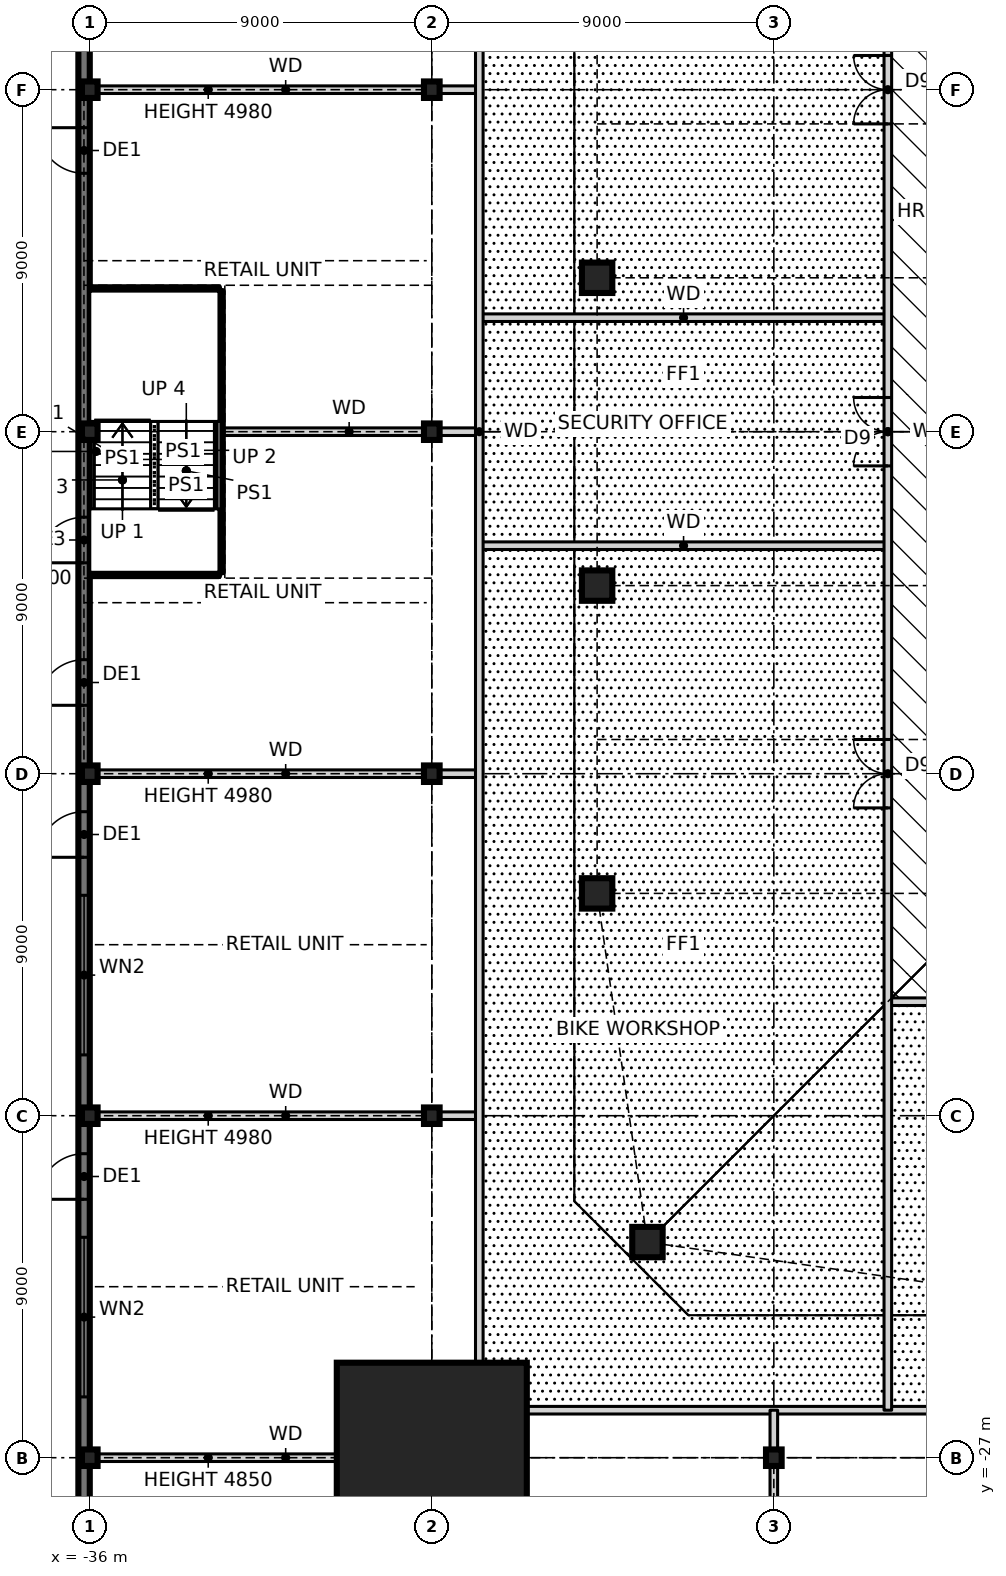
"""IFC4 building model, lengths in metres.
Left out: names, types, materials, properties, quantities, classifications, styles, units other than length and angle.
Written with IfcOpenShell. Run it as: python <this file> out.ifc"""

import sys

from ifc_helpers import new_model, si_unit, direction, frame, frame_2d, origin, origin_2d, place, context, subcontext, project, spatial, rectangle, hollow_rectangle, i_section, extrude, element, fill, save


model = new_model("IFC4")
c1 = context("Model", 3, precision=1e-05, world=origin(), true_north=direction((0.0, 1.0)))
c2 = subcontext(c1, "Body", "Model", "MODEL_VIEW")
j1 = project(units=[si_unit("LENGTHUNIT", "METRE"), si_unit("PLANEANGLEUNIT", "RADIAN")], contexts=[c1])
p1 = place(None, origin())
s1 = spatial("IfcSite", under=j1, at=p1, CompositionType="ELEMENT")
p2 = place(p1, origin())
s2 = spatial("IfcBuilding", under=s1, at=p2, CompositionType="ELEMENT")
p3 = place(p2, origin())
s3 = spatial("IfcBuildingStorey", under=s2, at=p3, CompositionType="ELEMENT", Elevation=0.0)
for number, where, z_axis, x_axis in (
    (1, (-21.326, -21.326, 0.0), (0.0, 0.0, 1.0), (1.0, 0.0, 0.0)),
    (2, (-22.65, 4.05, 0.0), (0.0, 0.0, 1.0), (1.0, 0.0, 0.0)),
    (3, (-22.65, -4.05, 0.0), (0.0, 0.0, 1.0), (1.0, 0.0, 0.0)),
    (4, (-22.65, -12.15, 0.0), (0.0, 0.0, 1.0), (1.0, 0.0, 0.0)),
):
    element("IfcColumn", number, at=place(p3, frame(where, z_axis=z_axis, x_axis=x_axis)), inside=s3, PredefinedType="COLUMN", context=c2, shape_type="SweptSolid", body=[
        extrude(hollow_rectangle(XDim=0.8, YDim=0.8, WallThickness=0.09, at=origin_2d()), origin(), (0.0, 0.0, 1.0), 6.0),
    ])
p4 = place(p3, frame((-27.0, -27.0, 0.0), z_axis=(0.0, 0.0, 1.0), x_axis=(1.0, 0.0, 0.0)))
e5 = element("IfcColumn", 5, at=p4, inside=s3, PredefinedType="COLUMN", context=c2, shape_type="SweptSolid", body=[
    extrude(rectangle(XDim=5.0, YDim=5.0, at=origin_2d()), origin(), (0.0, 0.0, 1.0), 6.0),
    extrude(i_section(OverallWidth=0.478, OverallDepth=0.599, WebThickness=0.1, FlangeThickness=0.14, at=origin_2d()), origin(), (0.0, 0.0, 1.0), 6.0),
])
for number, where, z_axis, x_axis in (
    (6, (-36.0, -27.0, 0.0), (0.0, 0.0, 1.0), (1.0, 0.0, 0.0)),
    (7, (-36.0, -18.0, 0.0), (0.0, 0.0, 1.0), (1.0, 0.0, 0.0)),
    (8, (-36.0, -9.0, 0.0), (0.0, 0.0, 1.0), (1.0, 0.0, 0.0)),
    (9, (-36.0, 0.0, 0.0), (0.0, 0.0, 1.0), (1.0, 0.0, 0.0)),
    (10, (-36.0, 9.0, 0.0), (0.0, 0.0, 1.0), (1.0, 0.0, 0.0)),
    (11, (-27.0, -18.0, 0.0), (0.0, 0.0, 1.0), (1.0, 0.0, 0.0)),
    (12, (-27.0, -9.0, 0.0), (0.0, 0.0, 1.0), (1.0, 0.0, 0.0)),
    (13, (-27.0, 0.0, 0.0), (0.0, 0.0, 1.0), (1.0, 0.0, 0.0)),
    (14, (-27.0, 9.0, 0.0), (0.0, 0.0, 1.0), (1.0, 0.0, 0.0)),
    (15, (-18.0, -27.0, 0.0), (0.0, 0.0, 1.0), (1.0, 0.0, 0.0)),
):
    element("IfcColumn", number, at=place(p3, frame(where, z_axis=z_axis, x_axis=x_axis)), inside=s3, PredefinedType="COLUMN", context=c2, shape_type="SweptSolid", body=[
        extrude(i_section(OverallWidth=0.411, OverallDepth=0.434, WebThickness=0.036, FlangeThickness=0.057, at=origin_2d()), origin(), (0.0, 0.0, 1.0), 6.0),
    ])
p5 = place(p3, frame((-36.15, 36.3, -0.25), z_axis=(0.0, 0.0, 1.0), x_axis=(0.0, -1.0, 0.0)))
e16 = element("IfcWall", 16, at=p5, inside=s3, PredefinedType="SOLIDWALL", context=c2, shape_type="SweptSolid", body=[
    extrude(rectangle(XDim=72.6, YDim=0.3, at=frame_2d((36.3, 0.0))), origin(), (0.0, 0.0, 1.0), 5.23),
])
p6 = place(p5, frame((55.3, 0.0, 0.25)))
e17 = element("IfcOpeningElement", 17, at=p6, cuts=e16, PredefinedType="OPENING", context=c2, shape_type="SweptSolid", body=[
    extrude(rectangle(XDim=1.2, YDim=2.4, at=frame_2d((0.6, 1.2))), frame((0.0, 0.16, 0.0), z_axis=(0.0, -1.0, 0.0), x_axis=(1.0, 0.0, 0.0)), (0.0, 0.0, 1.0), 0.32),
])
p7 = place(p5, frame((57.5, 0.0, 0.85)))
e18 = element("IfcOpeningElement", 18, at=p7, cuts=e16, PredefinedType="OPENING", context=c2, shape_type="SweptSolid", body=[
    extrude(rectangle(XDim=4.2, YDim=3.6, at=frame_2d((2.1, 1.8))), frame((0.0, 0.16, 0.0), z_axis=(0.0, -1.0, 0.0), x_axis=(1.0, 0.0, 0.0)), (0.0, 0.0, 1.0), 0.32),
])
p8 = place(p5, frame((46.3, 0.0, 0.25)))
e19 = element("IfcOpeningElement", 19, at=p8, cuts=e16, PredefinedType="OPENING", context=c2, shape_type="SweptSolid", body=[
    extrude(rectangle(XDim=1.2, YDim=2.4, at=frame_2d((0.6, 1.2))), frame((0.0, 0.16, 0.0), z_axis=(0.0, -1.0, 0.0), x_axis=(1.0, 0.0, 0.0)), (0.0, 0.0, 1.0), 0.32),
])
p9 = place(p5, frame((48.5, 0.0, 0.85)))
e20 = element("IfcOpeningElement", 20, at=p9, cuts=e16, PredefinedType="OPENING", context=c2, shape_type="SweptSolid", body=[
    extrude(rectangle(XDim=4.2, YDim=3.6, at=frame_2d((2.1, 1.8))), frame((0.0, 0.16, 0.0), z_axis=(0.0, -1.0, 0.0), x_axis=(1.0, 0.0, 0.0)), (0.0, 0.0, 1.0), 0.32),
])
p10 = place(p5, frame((19.3, 0.0, 0.25)))
e21 = element("IfcOpeningElement", 21, at=p10, cuts=e16, PredefinedType="OPENING", context=c2, shape_type="SweptSolid", body=[
    extrude(rectangle(XDim=1.2, YDim=2.4, at=frame_2d((0.6, 1.2))), frame((0.0, 0.16, 0.0), z_axis=(0.0, -1.0, 0.0), x_axis=(1.0, 0.0, 0.0)), (0.0, 0.0, 1.0), 0.32),
])
p11 = place(p5, frame((21.5, 0.0, 0.85)))
e22 = element("IfcOpeningElement", 22, at=p11, cuts=e16, PredefinedType="OPENING", context=c2, shape_type="SweptSolid", body=[
    extrude(rectangle(XDim=4.2, YDim=3.6, at=frame_2d((2.1, 1.8))), frame((0.0, 0.16, 0.0), z_axis=(0.0, -1.0, 0.0), x_axis=(1.0, 0.0, 0.0)), (0.0, 0.0, 1.0), 0.32),
])
p12 = place(p5, frame((10.3, 0.0, 0.25)))
e23 = element("IfcOpeningElement", 23, at=p12, cuts=e16, PredefinedType="OPENING", context=c2, shape_type="SweptSolid", body=[
    extrude(rectangle(XDim=1.2, YDim=2.4, at=frame_2d((0.6, 1.2))), frame((0.0, 0.16, 0.0), z_axis=(0.0, -1.0, 0.0), x_axis=(1.0, 0.0, 0.0)), (0.0, 0.0, 1.0), 0.32),
])
p13 = place(p5, frame((12.5, 0.0, 0.85)))
e24 = element("IfcOpeningElement", 24, at=p13, cuts=e16, PredefinedType="OPENING", context=c2, shape_type="SweptSolid", body=[
    extrude(rectangle(XDim=4.2, YDim=3.6, at=frame_2d((2.1, 1.8))), frame((0.0, 0.16, 0.0), z_axis=(0.0, -1.0, 0.0), x_axis=(1.0, 0.0, 0.0)), (0.0, 0.0, 1.0), 0.32),
])
p14 = place(p5, frame((38.55, 0.0, 0.25)))
e25 = element("IfcOpeningElement", 25, at=p14, cuts=e16, PredefinedType="OPENING", context=c2, shape_type="SweptSolid", body=[
    extrude(rectangle(XDim=1.2, YDim=2.4, at=frame_2d((0.6, 1.2))), frame((0.0, 0.16, 0.0), z_axis=(0.0, -1.0, 0.0), x_axis=(1.0, 0.0, 0.0)), (0.0, 0.0, 1.0), 0.32),
])
p15 = place(p5, frame((42.3, 0.0, 0.25)))
e26 = element("IfcOpeningElement", 26, at=p15, cuts=e16, PredefinedType="OPENING", context=c2, shape_type="SweptSolid", body=[
    extrude(rectangle(XDim=1.2, YDim=2.4, at=frame_2d((0.6, 1.2))), frame((0.0, 0.16, 0.0), z_axis=(0.0, -1.0, 0.0), x_axis=(1.0, 0.0, 0.0)), (0.0, 0.0, 1.0), 0.32),
])
p16 = place(p5, frame((28.3, 0.0, 0.25)))
e27 = element("IfcOpeningElement", 27, at=p16, cuts=e16, PredefinedType="OPENING", context=c2, shape_type="SweptSolid", body=[
    extrude(rectangle(XDim=1.2, YDim=2.4, at=frame_2d((0.6, 1.2))), frame((0.0, 0.16, 0.0), z_axis=(0.0, -1.0, 0.0), x_axis=(1.0, 0.0, 0.0)), (0.0, 0.0, 1.0), 0.32),
])
p17 = place(p3, frame((-35.94, -27.0, 0.0), z_axis=(0.0, 0.0, 1.0), x_axis=(1.0, 0.0, 0.0)))
e28 = element("IfcWall", 28, at=p17, inside=s3, PredefinedType="SOLIDWALL", context=c2, shape_type="SweptSolid", body=[
    extrude(rectangle(XDim=10.19, YDim=0.2, at=frame_2d((5.095, 0.0))), origin(), (0.0, 0.0, 1.0), 4.85),
])
p18 = place(p3, frame((-25.75, -25.75, 0.0), z_axis=(0.0, 0.0, 1.0), x_axis=(1.0, 0.0, 0.0)))
e29 = element("IfcWall", 29, at=p18, inside=s3, PredefinedType="SOLIDWALL", context=c2, shape_type="SweptSolid", body=[
    extrude(rectangle(XDim=51.5, YDim=0.2, at=frame_2d((25.75, 0.0))), origin(), (0.0, 0.0, 1.0), 3.0),
])
p19 = place(p3, frame((-35.94, -18.0, 0.0), z_axis=(0.0, 0.0, 1.0), x_axis=(1.0, 0.0, 0.0)))
e30 = element("IfcWall", 30, at=p19, inside=s3, PredefinedType="SOLIDWALL", context=c2, shape_type="SweptSolid", body=[
    extrude(rectangle(XDim=10.19, YDim=0.2, at=frame_2d((5.095, 0.0))), origin(), (0.0, 0.0, 1.0), 4.98),
])
p20 = place(p3, frame((-15.0, -15.0, 0.0), z_axis=(0.0, 0.0, 1.0), x_axis=(1.0, 0.0, 0.0)))
e31 = element("IfcWall", 31, at=p20, inside=s3, PredefinedType="SOLIDWALL", context=c2, shape_type="SweptSolid", body=[
    extrude(rectangle(XDim=30.0, YDim=0.2, at=frame_2d((15.0, 0.0))), origin(), (0.0, 0.0, 1.0), 5.75),
])
p21 = place(p20, frame((6.6, 0.0, 0.0)))
e32 = element("IfcOpeningElement", 32, at=p21, cuts=e31, PredefinedType="OPENING", context=c2, shape_type="SweptSolid", body=[
    extrude(rectangle(XDim=1.8, YDim=2.1, at=frame_2d((0.9, 1.05))), frame((0.0, 0.11, 0.0), z_axis=(0.0, -1.0, 0.0), x_axis=(1.0, 0.0, 0.0)), (0.0, 0.0, 1.0), 0.22),
])
p22 = place(p20, frame((21.6, 0.0, 0.0)))
e33 = element("IfcOpeningElement", 33, at=p22, cuts=e31, PredefinedType="OPENING", context=c2, shape_type="SweptSolid", body=[
    extrude(rectangle(XDim=1.8, YDim=2.1, at=frame_2d((0.9, 1.05))), frame((0.0, 0.11, 0.0), z_axis=(0.0, -1.0, 0.0), x_axis=(1.0, 0.0, 0.0)), (0.0, 0.0, 1.0), 0.22),
])
p23 = place(p3, frame((-35.94, -9.0, 0.0), z_axis=(0.0, 0.0, 1.0), x_axis=(1.0, 0.0, 0.0)))
e34 = element("IfcWall", 34, at=p23, inside=s3, PredefinedType="SOLIDWALL", context=c2, shape_type="SweptSolid", body=[
    extrude(rectangle(XDim=10.19, YDim=0.2, at=frame_2d((5.095, 0.0))), origin(), (0.0, 0.0, 1.0), 4.98),
])
p24 = place(p3, frame((-35.94, -3.7, 0.0), z_axis=(0.0, 0.0, 1.0), x_axis=(1.0, 0.0, 0.0)))
e35 = element("IfcWall", 35, at=p24, inside=s3, PredefinedType="SOLIDWALL", context=c2, shape_type="SweptSolid", body=[
    extrude(rectangle(XDim=3.34, YDim=0.2, at=frame_2d((1.67, 0.0))), origin(), (0.0, 0.0, 1.0), 6.0),
])
p25 = place(p3, frame((-25.75, -3.0, 0.0), z_axis=(0.0, 0.0, 1.0), x_axis=(1.0, 0.0, 0.0)))
e36 = element("IfcWall", 36, at=p25, inside=s3, PredefinedType="SOLIDWALL", context=c2, shape_type="SweptSolid", body=[
    extrude(rectangle(XDim=10.75, YDim=0.2, at=frame_2d((5.375, 0.0))), origin(), (0.0, 0.0, 1.0), 5.75),
])
p26 = place(p3, frame((-32.6, 0.0, 0.0), z_axis=(0.0, 0.0, 1.0), x_axis=(1.0, 0.0, 0.0)))
e37 = element("IfcWall", 37, at=p26, inside=s3, PredefinedType="SOLIDWALL", context=c2, shape_type="SweptSolid", body=[
    extrude(rectangle(XDim=6.85, YDim=0.2, at=frame_2d((3.425, 0.0))), origin(), (0.0, 0.0, 1.0), 5.75),
])
p27 = place(p3, frame((-25.75, 3.0, 0.0), z_axis=(0.0, 0.0, 1.0), x_axis=(1.0, 0.0, 0.0)))
e38 = element("IfcWall", 38, at=p27, inside=s3, PredefinedType="SOLIDWALL", context=c2, shape_type="SweptSolid", body=[
    extrude(rectangle(XDim=10.75, YDim=0.2, at=frame_2d((5.375, 0.0))), origin(), (0.0, 0.0, 1.0), 5.75),
])
p28 = place(p3, frame((-35.94, 3.7, 0.0), z_axis=(0.0, 0.0, 1.0), x_axis=(1.0, 0.0, 0.0)))
e39 = element("IfcWall", 39, at=p28, inside=s3, PredefinedType="SOLIDWALL", context=c2, shape_type="SweptSolid", body=[
    extrude(rectangle(XDim=3.34, YDim=0.2, at=frame_2d((1.67, 0.0))), origin(), (0.0, 0.0, 1.0), 6.0),
])
p29 = place(p3, frame((-35.94, 9.0, 0.0), z_axis=(0.0, 0.0, 1.0), x_axis=(1.0, 0.0, 0.0)))
e40 = element("IfcWall", 40, at=p29, inside=s3, PredefinedType="SOLIDWALL", context=c2, shape_type="SweptSolid", body=[
    extrude(rectangle(XDim=10.19, YDim=0.2, at=frame_2d((5.095, 0.0))), origin(), (0.0, 0.0, 1.0), 4.98),
])
p30 = place(p3, frame((-15.0, -25.75, 0.0), z_axis=(0.0, 0.0, 1.0), x_axis=(0.0, 1.0, 0.0)))
e41 = element("IfcWall", 41, at=p30, inside=s3, PredefinedType="SOLIDWALL", context=c2, shape_type="SweptSolid", body=[
    extrude(rectangle(XDim=51.5, YDim=0.2, at=frame_2d((25.75, 0.0))), origin(), (0.0, 0.0, 1.0), 5.75),
])
p31 = place(p30, frame((33.85, 0.0, 0.0)))
e42 = element("IfcOpeningElement", 42, at=p31, cuts=e41, PredefinedType="OPENING", context=c2, shape_type="SweptSolid", body=[
    extrude(rectangle(XDim=1.8, YDim=2.1, at=frame_2d((0.9, 1.05))), frame((0.0, 0.11, 0.0), z_axis=(0.0, -1.0, 0.0), x_axis=(1.0, 0.0, 0.0)), (0.0, 0.0, 1.0), 0.22),
])
p32 = place(p30, frame((24.85, 0.0, 0.0)))
e43 = element("IfcOpeningElement", 43, at=p32, cuts=e41, PredefinedType="OPENING", context=c2, shape_type="SweptSolid", body=[
    extrude(rectangle(XDim=1.8, YDim=2.1, at=frame_2d((0.9, 1.05))), frame((0.0, 0.11, 0.0), z_axis=(0.0, -1.0, 0.0), x_axis=(1.0, 0.0, 0.0)), (0.0, 0.0, 1.0), 0.22),
])
p33 = place(p30, frame((15.85, 0.0, 0.0)))
e44 = element("IfcOpeningElement", 44, at=p33, cuts=e41, PredefinedType="OPENING", context=c2, shape_type="SweptSolid", body=[
    extrude(rectangle(XDim=1.8, YDim=2.1, at=frame_2d((0.9, 1.05))), frame((0.0, 0.11, 0.0), z_axis=(0.0, -1.0, 0.0), x_axis=(1.0, 0.0, 0.0)), (0.0, 0.0, 1.0), 0.22),
])
p34 = place(p3, frame((-18.0, -35.94, 0.0), z_axis=(0.0, 0.0, 1.0), x_axis=(0.0, 1.0, 0.0)))
e45 = element("IfcWall", 45, at=p34, inside=s3, PredefinedType="SOLIDWALL", context=c2, shape_type="SweptSolid", body=[
    extrude(rectangle(XDim=10.19, YDim=0.2, at=frame_2d((5.095, 0.0))), origin(), (0.0, 0.0, 1.0), 4.98),
])
p35 = place(p3, frame((-25.75, -27.0, 0.0), z_axis=(0.0, 0.0, 1.0), x_axis=(0.0, 1.0, 0.0)))
e46 = element("IfcWall", 46, at=p35, inside=s3, PredefinedType="SOLIDWALL", context=c2, shape_type="SweptSolid", body=[
    extrude(rectangle(XDim=54.0, YDim=0.2, at=frame_2d((27.0, 0.0))), origin(), (0.0, 0.0, 1.0), 5.75),
])
p36 = place(p3, frame((-27.0, -35.94, 0.0), z_axis=(0.0, 0.0, 1.0), x_axis=(0.0, 1.0, 0.0)))
e47 = element("IfcWall", 47, at=p36, inside=s3, PredefinedType="SOLIDWALL", context=c2, shape_type="SweptSolid", body=[
    extrude(rectangle(XDim=8.94, YDim=0.2, at=frame_2d((4.47, 0.0))), origin(), (0.0, 0.0, 1.0), 4.85),
])
p37 = place(p3, frame((-32.6, -3.7, 0.0), z_axis=(0.0, 0.0, 1.0), x_axis=(0.0, 1.0, 0.0)))
e48 = element("IfcWall", 48, at=p37, inside=s3, PredefinedType="SOLIDWALL", context=c2, shape_type="SweptSolid", body=[
    extrude(rectangle(XDim=7.4, YDim=0.2, at=frame_2d((3.7, 0.0))), origin(), (0.0, 0.0, 1.0), 6.0),
])
p38 = place(p6, frame((1.2, 0.0, 0.0), z_axis=(0.0, 0.0, 1.0), x_axis=(-1.0, 0.0, 0.0)))
e49 = element("IfcDoor", 49, at=p38, inside=s3, OperationType="SINGLE_SWING_LEFT", PredefinedType="DOOR", context=c2, shape_type="SweptSolid", body=[
    extrude(rectangle(XDim=1.2, YDim=2.4, at=frame_2d((0.6, 1.2))), frame((0.0, 0.025, 0.0), z_axis=(0.0, -1.0, 0.0), x_axis=(1.0, 0.0, 0.0)), (0.0, 0.0, 1.0), 0.05),
])
fill(e17, e49)
p39 = place(p7, origin())
e50 = element("IfcWindow", 50, at=p39, inside=s3, PartitioningType="SINGLE_PANEL", PredefinedType="WINDOW", context=c2, shape_type="SweptSolid", body=[
    extrude(rectangle(XDim=4.2, YDim=3.6, at=frame_2d((2.1, 1.8))), frame((0.0, 0.03, 0.0), z_axis=(0.0, -1.0, 0.0), x_axis=(1.0, 0.0, 0.0)), (0.0, 0.0, 1.0), 0.06),
])
fill(e18, e50)
p40 = place(p8, frame((1.2, 0.0, 0.0), z_axis=(0.0, 0.0, 1.0), x_axis=(-1.0, 0.0, 0.0)))
e51 = element("IfcDoor", 51, at=p40, inside=s3, OperationType="SINGLE_SWING_LEFT", PredefinedType="DOOR", context=c2, shape_type="SweptSolid", body=[
    extrude(rectangle(XDim=1.2, YDim=2.4, at=frame_2d((0.6, 1.2))), frame((0.0, 0.025, 0.0), z_axis=(0.0, -1.0, 0.0), x_axis=(1.0, 0.0, 0.0)), (0.0, 0.0, 1.0), 0.05),
])
fill(e19, e51)
p41 = place(p9, origin())
e52 = element("IfcWindow", 52, at=p41, inside=s3, PartitioningType="SINGLE_PANEL", PredefinedType="WINDOW", context=c2, shape_type="SweptSolid", body=[
    extrude(rectangle(XDim=4.2, YDim=3.6, at=frame_2d((2.1, 1.8))), frame((0.0, 0.03, 0.0), z_axis=(0.0, -1.0, 0.0), x_axis=(1.0, 0.0, 0.0)), (0.0, 0.0, 1.0), 0.06),
])
fill(e20, e52)
p42 = place(p14, frame((1.2, 0.0, 0.0), z_axis=(0.0, 0.0, 1.0), x_axis=(-1.0, 0.0, 0.0)))
e53 = element("IfcDoor", 53, at=p42, inside=s3, OperationType="SINGLE_SWING_LEFT", PredefinedType="DOOR", context=c2, shape_type="SweptSolid", body=[
    extrude(rectangle(XDim=1.2, YDim=2.4, at=frame_2d((0.6, 1.2))), frame((0.0, 0.025, 0.0), z_axis=(0.0, -1.0, 0.0), x_axis=(1.0, 0.0, 0.0)), (0.0, 0.0, 1.0), 0.05),
])
fill(e25, e53)
p43 = place(p15, frame((1.2, 0.0, 0.0), z_axis=(0.0, 0.0, 1.0), x_axis=(-1.0, 0.0, 0.0)))
e54 = element("IfcDoor", 54, at=p43, inside=s3, OperationType="SINGLE_SWING_LEFT", PredefinedType="DOOR", context=c2, shape_type="SweptSolid", body=[
    extrude(rectangle(XDim=1.2, YDim=2.4, at=frame_2d((0.6, 1.2))), frame((0.0, 0.025, 0.0), z_axis=(0.0, -1.0, 0.0), x_axis=(1.0, 0.0, 0.0)), (0.0, 0.0, 1.0), 0.05),
])
fill(e26, e54)
p44 = place(p16, frame((1.2, 0.0, 0.0), z_axis=(0.0, 0.0, 1.0), x_axis=(-1.0, 0.0, 0.0)))
e55 = element("IfcDoor", 55, at=p44, inside=s3, OperationType="SINGLE_SWING_RIGHT", PredefinedType="DOOR", context=c2, shape_type="SweptSolid", body=[
    extrude(rectangle(XDim=1.2, YDim=2.4, at=frame_2d((0.6, 1.2))), frame((0.0, 0.025, 0.0), z_axis=(0.0, -1.0, 0.0), x_axis=(1.0, 0.0, 0.0)), (0.0, 0.0, 1.0), 0.05),
])
fill(e27, e55)
p45 = place(p31, origin())
e56 = element("IfcDoor", 56, at=p45, inside=s3, OperationType="DOUBLE_DOOR_SINGLE_SWING", PredefinedType="DOOR", context=c2, shape_type="SweptSolid", body=[
    extrude(rectangle(XDim=1.8, YDim=2.1, at=frame_2d((0.9, 1.05))), frame((0.0, 0.025, 0.0), z_axis=(0.0, -1.0, 0.0), x_axis=(1.0, 0.0, 0.0)), (0.0, 0.0, 1.0), 0.05),
])
fill(e42, e56)
p46 = place(p32, origin())
e57 = element("IfcDoor", 57, at=p46, inside=s3, OperationType="DOUBLE_DOOR_SINGLE_SWING", PredefinedType="DOOR", context=c2, shape_type="SweptSolid", body=[
    extrude(rectangle(XDim=1.8, YDim=2.1, at=frame_2d((0.9, 1.05))), frame((0.0, 0.025, 0.0), z_axis=(0.0, -1.0, 0.0), x_axis=(1.0, 0.0, 0.0)), (0.0, 0.0, 1.0), 0.05),
])
fill(e43, e57)
p47 = place(p33, origin())
e58 = element("IfcDoor", 58, at=p47, inside=s3, OperationType="DOUBLE_DOOR_SINGLE_SWING", PredefinedType="DOOR", context=c2, shape_type="SweptSolid", body=[
    extrude(rectangle(XDim=1.8, YDim=2.1, at=frame_2d((0.9, 1.05))), frame((0.0, 0.025, 0.0), z_axis=(0.0, -1.0, 0.0), x_axis=(1.0, 0.0, 0.0)), (0.0, 0.0, 1.0), 0.05),
])
fill(e44, e58)
save(model, sys.argv[1])
